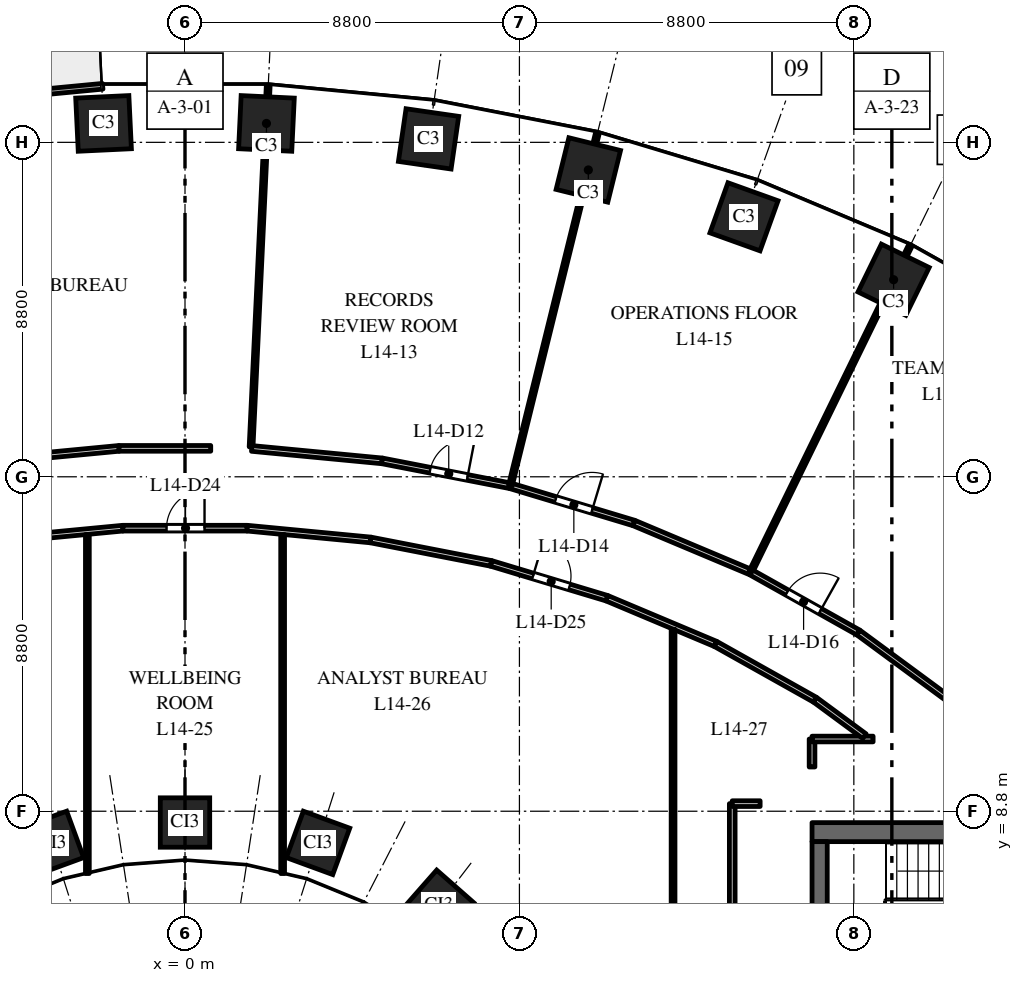
"""IFC4 building model, lengths in metres.
Left out: names, types, materials, properties, quantities, classifications, styles, units other than length and angle.
Written with IfcOpenShell. Run it as: python <this file> out.ifc"""

import sys

from ifc_helpers import new_model, si_unit, direction, frame, frame_2d, origin, origin_2d, place, context, subcontext, project, spatial, rectangle, extrude, element, fill, save


model = new_model("IFC4")
c1 = context("Model", 3, precision=1e-05, world=origin(), true_north=direction((0.0, 1.0)))
c2 = subcontext(c1, "Body", "Model", "MODEL_VIEW")
j1 = project(units=[si_unit("LENGTHUNIT", "METRE"), si_unit("PLANEANGLEUNIT", "RADIAN")], contexts=[c1])
p1 = place(None, origin())
s1 = spatial("IfcSite", under=j1, at=p1, CompositionType="ELEMENT")
p2 = place(p1, origin())
s2 = spatial("IfcBuilding", under=s1, at=p2, CompositionType="ELEMENT")
p3 = place(p2, frame((0.0, 0.0, 66.5)))
s3 = spatial("IfcBuildingStorey", under=s2, at=p3, CompositionType="ELEMENT", Elevation=66.5)
for number, where, z_axis, x_axis in (
    (1, (18.646, 22.785, 0.0), (0.0, 0.0, 1.0), (-0.898, 0.439, 0.0)),
    (2, (14.709, 24.441, 0.0), (0.0, 0.0, 1.0), (-0.941, 0.338, 0.0)),
    (3, (10.613, 25.674, 0.0), (0.0, 0.0, 1.0), (-0.971, 0.24, 0.0)),
    (4, (6.409, 26.491, 0.0), (0.0, 0.0, 1.0), (-0.99, 0.143, 0.0)),
    (5, (2.143, 26.898, 0.0), (0.0, 0.0, 1.0), (-0.999, 0.048, 0.0)),
    (6, (-2.143, 26.898, 0.0), (0.0, 0.0, 1.0), (-0.999, -0.048, 0.0)),
):
    element("IfcColumn", number, at=place(p3, frame(where, z_axis=z_axis, x_axis=x_axis)), inside=s3, PredefinedType="COLUMN", context=c2, shape_type="SweptSolid", body=[
        extrude(rectangle(XDim=1.4, YDim=1.4, at=origin_2d()), origin(), (0.0, 0.0, 1.0), 4.0),
    ])
for number, where, z_axis, x_axis in (
    (7, (6.682, 6.334, 0.0), (0.0, 0.0, 1.0), (-0.751, 0.66, 0.0)),
    (8, (3.501, 7.967, 0.0), (0.0, 0.0, 1.0), (-0.939, 0.344, 0.0)),
    (9, (0.0, 8.503, 0.0), (0.0, 0.0, 1.0), (-1.0, 0.0, 0.0)),
    (10, (-3.501, 7.967, 0.0), (0.0, 0.0, 1.0), (-0.939, -0.344, 0.0)),
):
    element("IfcColumn", number, at=place(p3, frame(where, z_axis=z_axis, x_axis=x_axis)), inside=s3, PredefinedType="COLUMN", context=c2, shape_type="SweptSolid", body=[
        extrude(rectangle(XDim=1.3, YDim=1.3, at=origin_2d()), origin(), (0.0, 0.0, 1.0), 4.0),
    ])
p4 = place(p3, frame((16.5, 8.25, 0.0), z_axis=(0.0, 0.0, 1.0), x_axis=(1.0, 0.0, 0.0)))
e11 = element("IfcWall", 11, at=p4, inside=s3, PredefinedType="SHEAR", context=c2, shape_type="SweptSolid", body=[
    extrude(rectangle(XDim=15.0, YDim=0.5, at=frame_2d((7.5, 0.0))), origin(), (0.0, 0.0, 1.0), 3.7),
])
p5 = place(p4, frame((6.9, 0.0, 0.0)))
e12 = element("IfcOpeningElement", 12, at=p5, cuts=e11, PredefinedType="OPENING", context=c2, shape_type="SweptSolid", body=[
    extrude(rectangle(XDim=1.2, YDim=2.1, at=frame_2d((0.6, 1.05))), frame((0.0, 0.26, 0.0), z_axis=(0.0, -1.0, 0.0), x_axis=(1.0, 0.0, 0.0)), (0.0, 0.0, 1.0), 0.52),
])
p6 = place(p4, frame((12.275, 0.0, 0.0)))
e13 = element("IfcOpeningElement", 13, at=p6, cuts=e11, PredefinedType="OPENING", context=c2, shape_type="SweptSolid", body=[
    extrude(rectangle(XDim=0.9, YDim=2.1, at=frame_2d((0.45, 1.05))), frame((0.0, 0.26, 0.0), z_axis=(0.0, -1.0, 0.0), x_axis=(1.0, 0.0, 0.0)), (0.0, 0.0, 1.0), 0.52),
])
p7 = place(p3, frame((16.7, -8.0, 0.0), z_axis=(0.0, 0.0, 1.0), x_axis=(0.0, 1.0, 0.0)))
e14 = element("IfcWall", 14, at=p7, inside=s3, PredefinedType="SHEAR", context=c2, shape_type="SweptSolid", body=[
    extrude(rectangle(XDim=16.0, YDim=0.4, at=frame_2d((8.0, 0.0))), origin(), (0.0, 0.0, 1.0), 3.7),
])
p8 = place(p3, frame((-2.166, 27.875, 0.0), z_axis=(0.0, 0.0, 1.0), x_axis=(-0.995473879823, -0.095035543824, 0.0)))
e15 = element("IfcWall", 15, at=p8, inside=s3, PredefinedType="STANDARD", context=c2, shape_type="SweptSolid", body=[
    extrude(rectangle(XDim=4.426, YDim=0.15, at=frame_2d((2.213, 0.0))), origin(), (0.0, 0.0, 1.0), 3.7),
])
p9 = place(p8, frame((1.713, 0.0, 0.0)))
e16 = element("IfcOpeningElement", 16, at=p9, cuts=e15, PredefinedType="OPENING", context=c2, shape_type="SweptSolid", body=[
    extrude(rectangle(XDim=1.0, YDim=2.4, at=frame_2d((0.5, 1.2))), frame((0.0, 0.085, 0.0), z_axis=(0.0, -1.0, 0.0), x_axis=(1.0, 0.0, 0.0)), (0.0, 0.0, 1.0), 0.17),
])
p10 = place(p3, frame((-5.184, 18.019, 0.0), z_axis=(0.0, 0.0, 1.0), x_axis=(0.995482474707, 0.09494547146, 0.0)))
e17 = element("IfcWall", 17, at=p10, inside=s3, PredefinedType="PARTITIONING", context=c2, shape_type="SweptSolid", body=[
    extrude(rectangle(XDim=3.464, YDim=0.15, at=frame_2d((1.732, 0.0))), origin(), (0.0, 0.0, 1.0), 3.7),
])
p11 = place(p3, frame((-4.884, 15.938, 0.0), z_axis=(0.0, 0.0, 1.0), x_axis=(0.99547459835, 0.095028017131, 0.0)))
e18 = element("IfcWall", 18, at=p11, inside=s3, PredefinedType="PARTITIONING", context=c2, shape_type="SweptSolid", body=[
    extrude(rectangle(XDim=3.263, YDim=0.15, at=frame_2d((1.631, 0.0))), origin(), (0.0, 0.0, 1.0), 3.7),
])
p12 = place(p3, frame((-2.569, 7.161, 0.0), z_axis=(0.0, 0.0, 1.0), x_axis=(0.0, 1.0, 0.0)))
e19 = element("IfcWall", 19, at=p12, inside=s3, PredefinedType="PARTITIONING", context=c2, shape_type="SweptSolid", body=[
    extrude(rectangle(XDim=8.919, YDim=0.1, at=frame_2d((4.459, 0.0))), origin(), (0.0, 0.0, 1.0), 2.85),
])
p13 = place(p3, frame((-1.736, 18.348, 0.0), z_axis=(0.0, 0.0, 1.0), x_axis=(1.0, 0.0, 0.0)))
e20 = element("IfcWall", 20, at=p13, inside=s3, PredefinedType="PARTITIONING", context=c2, shape_type="SweptSolid", body=[
    extrude(rectangle(XDim=2.413, YDim=0.15, at=frame_2d((1.207, 0.0))), origin(), (0.0, 0.0, 1.0), 2.85),
])
p14 = place(p3, frame((-1.636, 16.248, 0.0), z_axis=(0.0, 0.0, 1.0), x_axis=(1.0, 0.0, 0.0)))
e21 = element("IfcWall", 21, at=p14, inside=s3, PredefinedType="PARTITIONING", context=c2, shape_type="SweptSolid", body=[
    extrude(rectangle(XDim=3.272, YDim=0.15, at=frame_2d((1.636, 0.0))), origin(), (0.0, 0.0, 1.0), 2.85),
])
p15 = place(p14, frame((1.15, 0.0, 0.0)))
e22 = element("IfcOpeningElement", 22, at=p15, cuts=e21, PredefinedType="OPENING", context=c2, shape_type="SweptSolid", body=[
    extrude(rectangle(XDim=1.0, YDim=2.1, at=frame_2d((0.5, 1.05))), frame((0.0, 0.085, 0.0), z_axis=(0.0, -1.0, 0.0), x_axis=(1.0, 0.0, 0.0)), (0.0, 0.0, 1.0), 0.17),
])
p16 = place(p3, frame((1.636, 16.248, 0.0), z_axis=(0.0, 0.0, 1.0), x_axis=(0.99547459835, -0.095028017131, 0.0)))
e23 = element("IfcWall", 23, at=p16, inside=s3, PredefinedType="PARTITIONING", context=c2, shape_type="SweptSolid", body=[
    extrude(rectangle(XDim=3.263, YDim=0.15, at=frame_2d((1.631, 0.0))), origin(), (0.0, 0.0, 1.0), 2.85),
])
p17 = place(p3, frame((1.739, 18.386, 0.0), z_axis=(0.0, 0.0, 1.0), x_axis=(0.04735320064, 0.998878207986, 0.0)))
e24 = element("IfcWall", 24, at=p17, inside=s3, PredefinedType="PARTITIONING", context=c2, shape_type="SweptSolid", body=[
    extrude(rectangle(XDim=9.523, YDim=0.1, at=frame_2d((4.761, 0.0))), origin(), (0.0, 0.0, 1.0), 2.85),
])
p18 = place(p3, frame((1.756, 18.346, 0.0), z_axis=(0.0, 0.0, 1.0), x_axis=(0.99548367506, -0.094932885187, 0.0)))
e25 = element("IfcWall", 25, at=p18, inside=s3, PredefinedType="PARTITIONING", context=c2, shape_type="SweptSolid", body=[
    extrude(rectangle(XDim=3.444, YDim=0.15, at=frame_2d((1.722, 0.0))), origin(), (0.0, 0.0, 1.0), 2.85),
])
p19 = place(p3, frame((2.569, 7.161, 0.0), z_axis=(0.0, 0.0, 1.0), x_axis=(0.0, 1.0, 0.0)))
e26 = element("IfcWall", 26, at=p19, inside=s3, PredefinedType="PARTITIONING", context=c2, shape_type="SweptSolid", body=[
    extrude(rectangle(XDim=8.919, YDim=0.1, at=frame_2d((4.459, 0.0))), origin(), (0.0, 0.0, 1.0), 2.85),
])
p20 = place(p3, frame((4.884, 15.938, 0.0), z_axis=(0.0, 0.0, 1.0), x_axis=(0.981604377859, -0.190926282547, 0.0)))
e27 = element("IfcWall", 27, at=p20, inside=s3, PredefinedType="PARTITIONING", context=c2, shape_type="SweptSolid", body=[
    extrude(rectangle(XDim=3.231, YDim=0.15, at=frame_2d((1.616, 0.0))), origin(), (0.0, 0.0, 1.0), 3.7),
])
p21 = place(p3, frame((5.184, 18.019, 0.0), z_axis=(0.0, 0.0, 1.0), x_axis=(0.981650299947, -0.190690032812, 0.0)))
e28 = element("IfcWall", 28, at=p21, inside=s3, PredefinedType="PARTITIONING", context=c2, shape_type="SweptSolid", body=[
    extrude(rectangle(XDim=3.42, YDim=0.15, at=frame_2d((1.71, 0.0))), origin(), (0.0, 0.0, 1.0), 3.7),
])
p22 = place(p21, frame((1.289, 0.0, 0.0)))
e29 = element("IfcOpeningElement", 29, at=p22, cuts=e28, PredefinedType="OPENING", context=c2, shape_type="SweptSolid", body=[
    extrude(rectangle(XDim=1.0, YDim=2.1, at=frame_2d((0.5, 1.05))), frame((0.0, 0.085, 0.0), z_axis=(0.0, -1.0, 0.0), x_axis=(1.0, 0.0, 0.0)), (0.0, 0.0, 1.0), 0.17),
])
p23 = place(p3, frame((8.056, 15.321, 0.0), z_axis=(0.0, 0.0, 1.0), x_axis=(0.957612601062, -0.28805920622, 0.0)))
e30 = element("IfcWall", 30, at=p23, inside=s3, PredefinedType="PARTITIONING", context=c2, shape_type="SweptSolid", body=[
    extrude(rectangle(XDim=3.18, YDim=0.15, at=frame_2d((1.59, 0.0))), origin(), (0.0, 0.0, 1.0), 2.85),
])
p24 = place(p23, frame((1.15, 0.0, 0.0)))
e31 = element("IfcOpeningElement", 31, at=p24, cuts=e30, PredefinedType="OPENING", context=c2, shape_type="SweptSolid", body=[
    extrude(rectangle(XDim=1.0, YDim=2.1, at=frame_2d((0.5, 1.05))), frame((0.0, 0.085, 0.0), z_axis=(0.0, -1.0, 0.0), x_axis=(1.0, 0.0, 0.0)), (0.0, 0.0, 1.0), 0.17),
])
p25 = place(p3, frame((8.56, 17.363, 0.0), z_axis=(0.0, 0.0, 1.0), x_axis=(0.95754884035, -0.28827108482, 0.0)))
e32 = element("IfcWall", 32, at=p25, inside=s3, PredefinedType="PARTITIONING", context=c2, shape_type="SweptSolid", body=[
    extrude(rectangle(XDim=3.396, YDim=0.15, at=frame_2d((1.698, 0.0))), origin(), (0.0, 0.0, 1.0), 2.85),
])
p26 = place(p25, frame((1.246, 0.0, 0.0)))
e33 = element("IfcOpeningElement", 33, at=p26, cuts=e32, PredefinedType="OPENING", context=c2, shape_type="SweptSolid", body=[
    extrude(rectangle(XDim=1.0, YDim=2.1, at=frame_2d((0.5, 1.05))), frame((0.0, 0.085, 0.0), z_axis=(0.0, -1.0, 0.0), x_axis=(1.0, 0.0, 0.0)), (0.0, 0.0, 1.0), 0.17),
])
p27 = place(p3, frame((8.561, 17.367, 0.0), z_axis=(0.0, 0.0, 1.0), x_axis=(0.239800031194, 0.970822303534, 0.0)))
e34 = element("IfcWall", 34, at=p27, inside=s3, PredefinedType="PARTITIONING", context=c2, shape_type="SweptSolid", body=[
    extrude(rectangle(XDim=9.558, YDim=0.1, at=frame_2d((4.779, 0.0))), origin(), (0.0, 0.0, 1.0), 2.85),
])
p28 = place(p3, frame((11.101, 14.405, 0.0), z_axis=(0.0, 0.0, 1.0), x_axis=(0.921753827375, -0.387775555857, 0.0)))
e35 = element("IfcWall", 35, at=p28, inside=s3, PredefinedType="PARTITIONING", context=c2, shape_type="SweptSolid", body=[
    extrude(rectangle(XDim=3.103, YDim=0.15, at=frame_2d((1.551, 0.0))), origin(), (0.0, 0.0, 1.0), 3.7),
])
p29 = place(p3, frame((11.812, 16.384, 0.0), z_axis=(0.0, 0.0, 1.0), x_axis=(0.921839278558, -0.387572373252, 0.0)))
e36 = element("IfcWall", 36, at=p29, inside=s3, PredefinedType="PARTITIONING", context=c2, shape_type="SweptSolid", body=[
    extrude(rectangle(XDim=3.333, YDim=0.15, at=frame_2d((1.667, 0.0))), origin(), (0.0, 0.0, 1.0), 3.7),
])
p30 = place(p3, frame((12.843, -13.587, 0.0), z_axis=(0.0, 0.0, 1.0), x_axis=(0.0, 1.0, 0.0)))
e37 = element("IfcWall", 37, at=p30, inside=s3, PredefinedType="PARTITIONING", context=c2, shape_type="SweptSolid", body=[
    extrude(rectangle(XDim=27.174, YDim=0.1, at=frame_2d((13.587, 0.0))), origin(), (0.0, 0.0, 1.0), 2.75),
])
p31 = place(p3, frame((13.961, 13.202, 0.0), z_axis=(0.0, 0.0, 1.0), x_axis=(0.872164226045, -0.489213207924, 0.0)))
e38 = element("IfcWall", 38, at=p31, inside=s3, PredefinedType="PARTITIONING", context=c2, shape_type="SweptSolid", body=[
    extrude(rectangle(XDim=2.998, YDim=0.15, at=frame_2d((1.499, 0.0))), origin(), (0.0, 0.0, 1.0), 3.7),
])
p32 = place(p3, frame((14.4, -9.0, 0.0), z_axis=(0.0, 0.0, 1.0), x_axis=(0.0, 1.0, 0.0)))
e39 = element("IfcWall", 39, at=p32, inside=s3, PredefinedType="PARTITIONING", context=c2, shape_type="SweptSolid", body=[
    extrude(rectangle(XDim=18.0, YDim=0.15, at=frame_2d((9.0, 0.0))), origin(), (0.0, 0.0, 1.0), 2.75),
])
p33 = place(p32, frame((8.6, 0.0, 0.0)))
e40 = element("IfcOpeningElement", 40, at=p33, cuts=e39, PredefinedType="OPENING", context=c2, shape_type="SweptSolid", body=[
    extrude(rectangle(XDim=1.0, YDim=2.1, at=frame_2d((0.5, 1.05))), frame((0.0, 0.085, 0.0), z_axis=(0.0, -1.0, 0.0), x_axis=(1.0, 0.0, 0.0)), (0.0, 0.0, 1.0), 0.17),
])
p34 = place(p3, frame((14.4, 9.0, 0.0), z_axis=(0.0, 0.0, 1.0), x_axis=(1.0, 0.0, 0.0)))
e41 = element("IfcWall", 41, at=p34, inside=s3, PredefinedType="PARTITIONING", context=c2, shape_type="SweptSolid", body=[
    extrude(rectangle(XDim=0.734, YDim=0.15, at=frame_2d((0.367, 0.0))), origin(), (0.0, 0.0, 1.0), 3.7),
])
p35 = place(p3, frame((14.887, 15.096, 0.0), z_axis=(0.0, 0.0, 1.0), x_axis=(0.439197765869, 0.89839040648, 0.0)))
e42 = element("IfcWall", 42, at=p35, inside=s3, PredefinedType="PARTITIONING", context=c2, shape_type="SweptSolid", body=[
    extrude(rectangle(XDim=9.561, YDim=0.1, at=frame_2d((4.78, 0.0))), origin(), (0.0, 0.0, 1.0), 2.85),
])
p36 = place(p3, frame((14.902, 15.082, 0.0), z_axis=(0.0, 0.0, 1.0), x_axis=(0.872144615544, -0.489248167679, 0.0)))
e43 = element("IfcWall", 43, at=p36, inside=s3, PredefinedType="PARTITIONING", context=c2, shape_type="SweptSolid", body=[
    extrude(rectangle(XDim=3.228, YDim=0.15, at=frame_2d((1.614, 0.0))), origin(), (0.0, 0.0, 1.0), 3.7),
])
p37 = place(p36, frame((1.078, 0.0, 0.0)))
e44 = element("IfcOpeningElement", 44, at=p37, cuts=e43, PredefinedType="OPENING", context=c2, shape_type="SweptSolid", body=[
    extrude(rectangle(XDim=1.0, YDim=2.1, at=frame_2d((0.5, 1.05))), frame((0.0, 0.085, 0.0), z_axis=(0.0, -1.0, 0.0), x_axis=(1.0, 0.0, 0.0)), (0.0, 0.0, 1.0), 0.17),
])
p38 = place(p3, frame((16.5, 9.964, 0.0), z_axis=(0.0, 0.0, 1.0), x_axis=(0.0, 1.0, 0.0)))
e45 = element("IfcWall", 45, at=p38, inside=s3, PredefinedType="PARTITIONING", context=c2, shape_type="SweptSolid", body=[
    extrude(rectangle(XDim=0.736, YDim=0.15, at=frame_2d((0.368, 0.0))), origin(), (0.0, 0.0, 1.0), 3.7),
])
p39 = place(p3, frame((16.5, 10.7, 0.0), z_axis=(0.0, 0.0, 1.0), x_axis=(1.0, 0.0, 0.0)))
e46 = element("IfcWall", 46, at=p39, inside=s3, PredefinedType="PARTITIONING", context=c2, shape_type="SweptSolid", body=[
    extrude(rectangle(XDim=1.607, YDim=0.15, at=frame_2d((0.803, 0.0))), origin(), (0.0, 0.0, 1.0), 3.7),
])
p40 = place(p3, frame((16.576, 11.735, 0.0), z_axis=(0.0, 0.0, 1.0), x_axis=(0.805021714708, -0.593245344566, 0.0)))
e47 = element("IfcWall", 47, at=p40, inside=s3, PredefinedType="PARTITIONING", context=c2, shape_type="SweptSolid", body=[
    extrude(rectangle(XDim=1.619, YDim=0.15, at=frame_2d((0.809, 0.0))), origin(), (0.0, 0.0, 1.0), 3.7),
])
p41 = place(p3, frame((17.717, 13.503, 0.0), z_axis=(0.0, 0.0, 1.0), x_axis=(0.805106688633, -0.593130019404, 0.0)))
e48 = element("IfcWall", 48, at=p41, inside=s3, PredefinedType="PARTITIONING", context=c2, shape_type="SweptSolid", body=[
    extrude(rectangle(XDim=3.137, YDim=0.15, at=frame_2d((1.569, 0.0))), origin(), (0.0, 0.0, 1.0), 3.7),
])
p42 = place(p22, origin())
e49 = element("IfcDoor", 49, at=p42, inside=s3, OperationType="SINGLE_SWING_RIGHT", PredefinedType="DOOR", context=c2, shape_type="SweptSolid", body=[
    extrude(rectangle(XDim=1.0, YDim=2.1, at=frame_2d((0.5, 1.05))), frame((0.0, 0.025, 0.0), z_axis=(0.0, -1.0, 0.0), x_axis=(1.0, 0.0, 0.0)), (0.0, 0.0, 1.0), 0.05),
])
fill(e29, e49)
p43 = place(p26, origin())
e50 = element("IfcDoor", 50, at=p43, inside=s3, OperationType="SINGLE_SWING_RIGHT", PredefinedType="DOOR", context=c2, shape_type="SweptSolid", body=[
    extrude(rectangle(XDim=1.0, YDim=2.1, at=frame_2d((0.5, 1.05))), frame((0.0, 0.025, 0.0), z_axis=(0.0, -1.0, 0.0), x_axis=(1.0, 0.0, 0.0)), (0.0, 0.0, 1.0), 0.05),
])
fill(e33, e50)
p44 = place(p37, origin())
e51 = element("IfcDoor", 51, at=p44, inside=s3, OperationType="SINGLE_SWING_RIGHT", PredefinedType="DOOR", context=c2, shape_type="SweptSolid", body=[
    extrude(rectangle(XDim=1.0, YDim=2.1, at=frame_2d((0.5, 1.05))), frame((0.0, 0.025, 0.0), z_axis=(0.0, -1.0, 0.0), x_axis=(1.0, 0.0, 0.0)), (0.0, 0.0, 1.0), 0.05),
])
fill(e44, e51)
p45 = place(p15, origin())
e52 = element("IfcDoor", 52, at=p45, inside=s3, OperationType="SINGLE_SWING_RIGHT", PredefinedType="DOOR", context=c2, shape_type="SweptSolid", body=[
    extrude(rectangle(XDim=1.0, YDim=2.1, at=frame_2d((0.5, 1.05))), frame((0.0, 0.025, 0.0), z_axis=(0.0, -1.0, 0.0), x_axis=(1.0, 0.0, 0.0)), (0.0, 0.0, 1.0), 0.05),
])
fill(e22, e52)
p46 = place(p24, origin())
e53 = element("IfcDoor", 53, at=p46, inside=s3, OperationType="SINGLE_SWING_LEFT", PredefinedType="DOOR", context=c2, shape_type="SweptSolid", body=[
    extrude(rectangle(XDim=1.0, YDim=2.1, at=frame_2d((0.5, 1.05))), frame((0.0, 0.025, 0.0), z_axis=(0.0, -1.0, 0.0), x_axis=(1.0, 0.0, 0.0)), (0.0, 0.0, 1.0), 0.05),
])
fill(e31, e53)
save(model, sys.argv[1])
